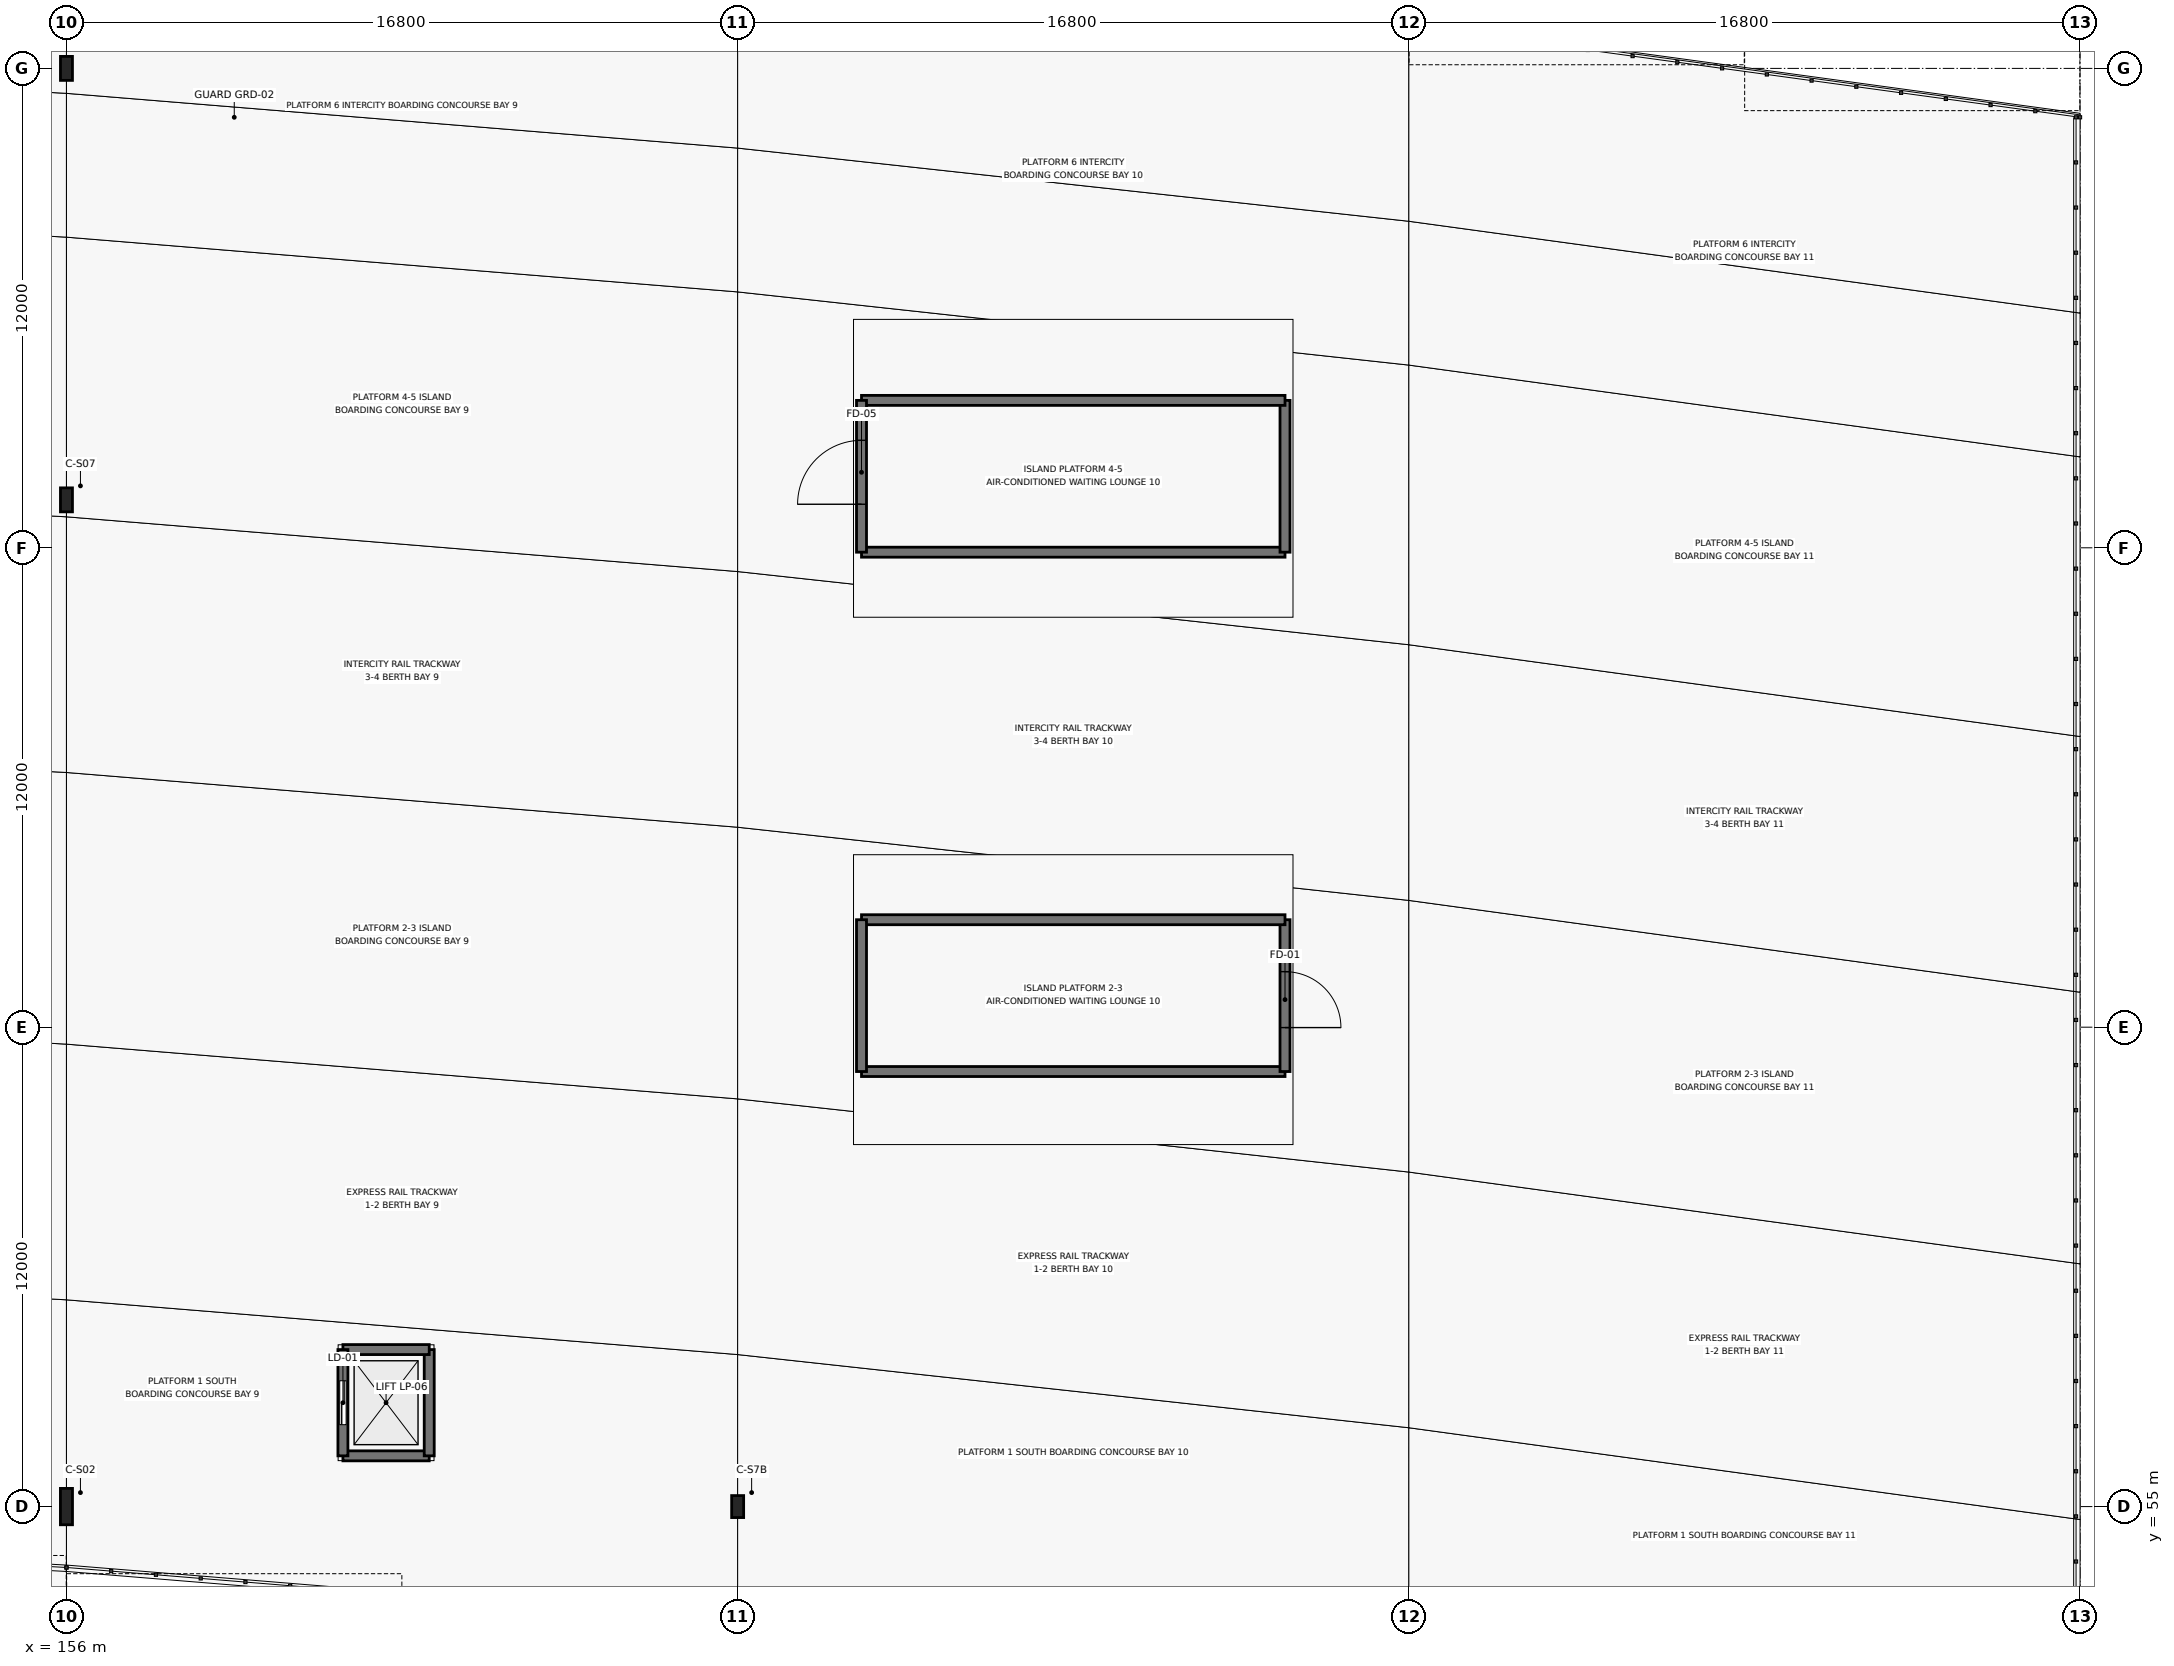
"""IFC4 building model, lengths in metres.
Left out: names, types, materials, properties, quantities, classifications, styles, units other than length and angle.
Written with IfcOpenShell. Run it as: python <this file> out.ifc"""

import sys

from ifc_helpers import new_model, si_unit, direction, frame, frame_2d, origin, origin_2d, place, context, subcontext, project, spatial, rectangle, i_section, extrude, element, fill, save


model = new_model("IFC4")
c1 = context("Model", 3, precision=1e-05, world=origin(), true_north=direction((0.0, 1.0)))
c2 = subcontext(c1, "Body", "Model", "MODEL_VIEW")
j1 = project(units=[si_unit("LENGTHUNIT", "METRE"), si_unit("PLANEANGLEUNIT", "RADIAN")], contexts=[c1])
p1 = place(None, origin())
s1 = spatial("IfcSite", under=j1, at=p1, CompositionType="ELEMENT")
p2 = place(p1, origin())
s2 = spatial("IfcBuilding", under=s1, at=p2, CompositionType="ELEMENT")
p3 = place(p2, frame((0.0, 0.0, 10.8)))
s3 = spatial("IfcBuildingStorey", under=s2, at=p3, CompositionType="ELEMENT", Elevation=10.8)
for number, where, z_axis, x_axis in (
    (1, (156.0, 80.2, 0.0), (0.0, 0.0, 1.0), (1.0, 0.0, 0.0)),
    (2, (156.0, 91.0, 0.0), (0.0, 0.0, 1.0), (1.0, 0.0, 0.0)),
):
    element("IfcColumn", number, at=place(p3, frame(where, z_axis=z_axis, x_axis=x_axis)), inside=s3, PredefinedType="COLUMN", context=c2, shape_type="SweptSolid", body=[
        extrude(i_section(OverallWidth=0.3, OverallDepth=0.6, WebThickness=0.015, FlangeThickness=0.03, FilletRadius=0.027, at=origin_2d()), origin(), (0.0, 0.0, 1.0), 6.0),
    ])
p4 = place(p3, frame((162.92, 56.27, 0.0), z_axis=(0.0, 0.0, 1.0), x_axis=(1.0, 0.0, 0.0)))
e3 = element("IfcWall", 3, at=p4, inside=s3, PredefinedType="SHEAR", context=c2, shape_type="SweptSolid", body=[
    extrude(rectangle(XDim=2.16, YDim=0.25, at=frame_2d((1.08, 0.0))), origin(), (0.0, 0.0, 1.0), 5.37),
])
p5 = place(p3, frame((165.08, 56.27, 0.0), z_axis=(0.0, 0.0, 1.0), x_axis=(0.0, 1.0, 0.0)))
e4 = element("IfcWall", 4, at=p5, inside=s3, PredefinedType="SHEAR", context=c2, shape_type="SweptSolid", body=[
    extrude(rectangle(XDim=2.66, YDim=0.25, at=frame_2d((1.33, 0.0))), origin(), (0.0, 0.0, 1.0), 5.37),
])
p6 = place(p3, frame((165.08, 58.93, 0.0), z_axis=(0.0, 0.0, 1.0), x_axis=(-1.0, 0.0, 0.0)))
e5 = element("IfcWall", 5, at=p6, inside=s3, PredefinedType="SHEAR", context=c2, shape_type="SweptSolid", body=[
    extrude(rectangle(XDim=2.16, YDim=0.25, at=frame_2d((1.08, 0.0))), origin(), (0.0, 0.0, 1.0), 5.37),
])
p7 = place(p3, frame((162.92, 58.93, 0.0), z_axis=(0.0, 0.0, 1.0), x_axis=(0.0, -1.0, 0.0)))
e6 = element("IfcWall", 6, at=p7, inside=s3, PredefinedType="SHEAR", context=c2, shape_type="SweptSolid", body=[
    extrude(rectangle(XDim=2.66, YDim=0.25, at=frame_2d((1.33, 0.0))), origin(), (0.0, 0.0, 1.0), 5.37),
])
p8 = place(p7, frame((0.78, 0.0, 0.0)))
e7 = element("IfcOpeningElement", 7, at=p8, cuts=e6, PredefinedType="OPENING", context=c2, shape_type="SweptSolid", body=[
    extrude(rectangle(XDim=1.1, YDim=2.2, at=frame_2d((0.55, 1.1))), frame((0.0, 0.135, 0.0), z_axis=(0.0, -1.0, 0.0), x_axis=(1.0, 0.0, 0.0)), (0.0, 0.0, 1.0), 0.27),
])
p9 = place(p3, frame((175.9, 65.89, 0.0), z_axis=(0.0, 0.0, 1.0), x_axis=(1.0, 0.0, 0.0)))
e8 = element("IfcWall", 8, at=p9, inside=s3, PredefinedType="SHEAR", context=c2, shape_type="SweptSolid", body=[
    extrude(rectangle(XDim=10.6, YDim=0.25, at=frame_2d((5.3, 0.0))), origin(), (0.0, 0.0, 1.0), 3.4),
])
p10 = place(p3, frame((186.5, 65.89, 0.0), z_axis=(0.0, 0.0, 1.0), x_axis=(0.0, 1.0, 0.0)))
e9 = element("IfcWall", 9, at=p10, inside=s3, PredefinedType="SHEAR", context=c2, shape_type="SweptSolid", body=[
    extrude(rectangle(XDim=3.8, YDim=0.25, at=frame_2d((1.9, 0.0))), origin(), (0.0, 0.0, 1.0), 3.4),
])
p11 = place(p10, frame((2.5, 0.0, 0.0), z_axis=(0.0, 0.0, 1.0), x_axis=(-1.0, 0.0, 0.0)))
e10 = element("IfcOpeningElement", 10, at=p11, cuts=e9, PredefinedType="OPENING", context=c2, shape_type="SweptSolid", body=[
    extrude(rectangle(XDim=1.4, YDim=2.2, at=frame_2d((0.7, 1.1))), frame((0.0, 0.135, 0.0), z_axis=(0.0, -1.0, 0.0), x_axis=(1.0, 0.0, 0.0)), (0.0, 0.0, 1.0), 0.27),
])
p12 = place(p3, frame((186.5, 69.69, 0.0), z_axis=(0.0, 0.0, 1.0), x_axis=(-1.0, 0.0, 0.0)))
e11 = element("IfcWall", 11, at=p12, inside=s3, PredefinedType="SHEAR", context=c2, shape_type="SweptSolid", body=[
    extrude(rectangle(XDim=10.6, YDim=0.25, at=frame_2d((5.3, 0.0))), origin(), (0.0, 0.0, 1.0), 3.4),
])
p13 = place(p3, frame((175.9, 69.69, 0.0), z_axis=(0.0, 0.0, 1.0), x_axis=(0.0, -1.0, 0.0)))
e12 = element("IfcWall", 12, at=p13, inside=s3, PredefinedType="SHEAR", context=c2, shape_type="SweptSolid", body=[
    extrude(rectangle(XDim=3.8, YDim=0.25, at=frame_2d((1.9, 0.0))), origin(), (0.0, 0.0, 1.0), 3.4),
])
p14 = place(p3, frame((175.9, 78.89, 0.0), z_axis=(0.0, 0.0, 1.0), x_axis=(1.0, 0.0, 0.0)))
e13 = element("IfcWall", 13, at=p14, inside=s3, PredefinedType="SHEAR", context=c2, shape_type="SweptSolid", body=[
    extrude(rectangle(XDim=10.6, YDim=0.25, at=frame_2d((5.3, 0.0))), origin(), (0.0, 0.0, 1.0), 3.4),
])
p15 = place(p3, frame((186.5, 78.89, 0.0), z_axis=(0.0, 0.0, 1.0), x_axis=(0.0, 1.0, 0.0)))
e14 = element("IfcWall", 14, at=p15, inside=s3, PredefinedType="SHEAR", context=c2, shape_type="SweptSolid", body=[
    extrude(rectangle(XDim=3.8, YDim=0.25, at=frame_2d((1.9, 0.0))), origin(), (0.0, 0.0, 1.0), 3.4),
])
p16 = place(p3, frame((186.5, 82.69, 0.0), z_axis=(0.0, 0.0, 1.0), x_axis=(-1.0, 0.0, 0.0)))
e15 = element("IfcWall", 15, at=p16, inside=s3, PredefinedType="SHEAR", context=c2, shape_type="SweptSolid", body=[
    extrude(rectangle(XDim=10.6, YDim=0.25, at=frame_2d((5.3, 0.0))), origin(), (0.0, 0.0, 1.0), 3.4),
])
p17 = place(p3, frame((175.9, 82.69, 0.0), z_axis=(0.0, 0.0, 1.0), x_axis=(0.0, -1.0, 0.0)))
e16 = element("IfcWall", 16, at=p17, inside=s3, PredefinedType="SHEAR", context=c2, shape_type="SweptSolid", body=[
    extrude(rectangle(XDim=3.8, YDim=0.25, at=frame_2d((1.9, 0.0))), origin(), (0.0, 0.0, 1.0), 3.4),
])
p18 = place(p17, frame((1.0, 0.0, 0.0)))
e17 = element("IfcOpeningElement", 17, at=p18, cuts=e16, PredefinedType="OPENING", context=c2, shape_type="SweptSolid", body=[
    extrude(rectangle(XDim=1.6, YDim=2.25, at=frame_2d((0.8, 1.125))), frame((0.0, 0.135, 0.0), z_axis=(0.0, -1.0, 0.0), x_axis=(1.0, 0.0, 0.0)), (0.0, 0.0, 1.0), 0.27),
])
p19 = place(p8, origin())
e18 = element("IfcDoor", 18, at=p19, inside=s3, OperationType="SLIDING_TO_RIGHT", PredefinedType="DOOR", context=c2, shape_type="SweptSolid", body=[
    extrude(rectangle(XDim=1.1, YDim=2.2, at=frame_2d((0.55, 1.1))), frame((0.0, 0.025, 0.0), z_axis=(0.0, -1.0, 0.0), x_axis=(1.0, 0.0, 0.0)), (0.0, 0.0, 1.0), 0.05),
])
fill(e7, e18)
p20 = place(p11, origin())
e19 = element("IfcDoor", 19, at=p20, inside=s3, OperationType="SINGLE_SWING_LEFT", PredefinedType="DOOR", context=c2, shape_type="SweptSolid", body=[
    extrude(rectangle(XDim=1.4, YDim=2.2, at=frame_2d((0.7, 1.1))), frame((0.0, 0.025, 0.0), z_axis=(0.0, -1.0, 0.0), x_axis=(1.0, 0.0, 0.0)), (0.0, 0.0, 1.0), 0.05),
])
fill(e10, e19)
p21 = place(p18, origin())
e20 = element("IfcDoor", 20, at=p21, inside=s3, OperationType="SINGLE_SWING_RIGHT", PredefinedType="DOOR", context=c2, shape_type="SweptSolid", body=[
    extrude(rectangle(XDim=1.6, YDim=2.25, at=frame_2d((0.8, 1.125))), frame((0.0, 0.025, 0.0), z_axis=(0.0, -1.0, 0.0), x_axis=(1.0, 0.0, 0.0)), (0.0, 0.0, 1.0), 0.05),
])
fill(e17, e20)
save(model, sys.argv[1])
